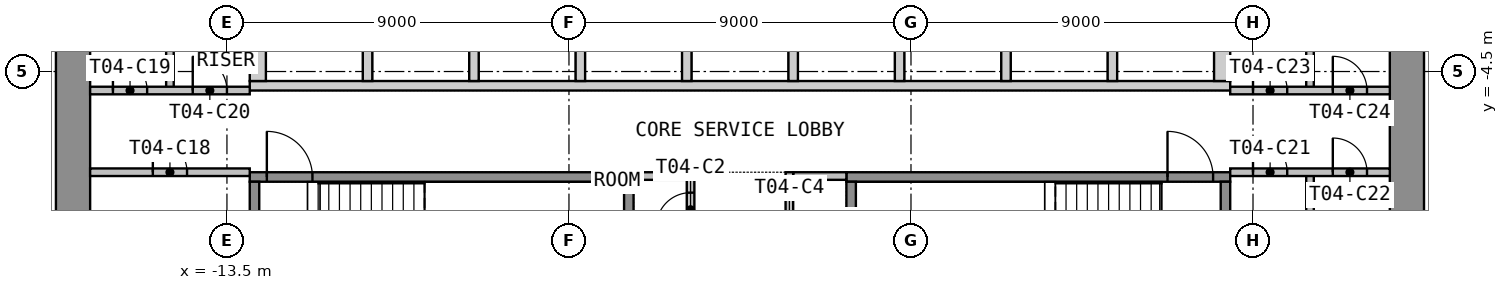
"""IFC4 building model, lengths in metres.
Left out: names, types, materials, properties, quantities, classifications, styles, units other than length and angle.
Written with IfcOpenShell. Run it as: python <this file> out.ifc"""

import sys

from ifc_helpers import new_model, si_unit, direction, frame, frame_2d, origin, place, context, subcontext, project, spatial, polyline, rectangle, outline, extrude, element, fill, save


model = new_model("IFC4")
c1 = context("Model", 3, precision=1e-05, world=origin(), true_north=direction((0.0, 1.0)))
c2 = subcontext(c1, "Body", "Model", "MODEL_VIEW")
j1 = project(units=[si_unit("LENGTHUNIT", "METRE"), si_unit("PLANEANGLEUNIT", "RADIAN")], contexts=[c1])
p1 = place(None, origin())
s1 = spatial("IfcSite", under=j1, at=p1, CompositionType="ELEMENT")
p2 = place(p1, origin())
s2 = spatial("IfcBuilding", under=s1, at=p2, CompositionType="ELEMENT")
p3 = place(p2, frame((0.0, 0.0, 65.1)))
s3 = spatial("IfcBuildingStorey", under=s2, at=p3, CompositionType="ELEMENT", Elevation=65.1)
p4 = place(p3, frame((-17.55, -12.6, 0.0), z_axis=(0.0, 0.0, 1.0), x_axis=(0.0, 1.0, 0.0)))
e1 = element("IfcWall", 1, at=p4, inside=s3, PredefinedType="SHEAR", context=c2, shape_type="SweptSolid", body=[
    extrude(rectangle(XDim=25.2, YDim=0.9, at=frame_2d((12.6, 0.0))), origin(), (0.0, 0.0, 1.0), 3.525),
])
p5 = place(p4, frame((11.4, 0.0, 0.0)))
e2 = element("IfcOpeningElement", 2, at=p5, cuts=e1, PredefinedType="OPENING", context=c2, shape_type="SweptSolid", body=[
    extrude(rectangle(XDim=2.4, YDim=2.1, at=frame_2d((1.2, 1.05))), frame((0.0, 0.46, 0.0), z_axis=(0.0, -1.0, 0.0), x_axis=(1.0, 0.0, 0.0)), (0.0, 0.0, 1.0), 0.92),
])
p6 = place(p3, frame((17.55, -12.6, 0.0), z_axis=(0.0, 0.0, 1.0), x_axis=(0.0, 1.0, 0.0)))
e3 = element("IfcWall", 3, at=p6, inside=s3, PredefinedType="SHEAR", context=c2, shape_type="SweptSolid", body=[
    extrude(rectangle(XDim=25.2, YDim=0.9, at=frame_2d((12.6, 0.0))), origin(), (0.0, 0.0, 1.0), 3.525),
])
p7 = place(p6, frame((11.4, 0.0, 0.0)))
e4 = element("IfcOpeningElement", 4, at=p7, cuts=e3, PredefinedType="OPENING", context=c2, shape_type="SweptSolid", body=[
    extrude(rectangle(XDim=2.4, YDim=2.1, at=frame_2d((1.2, 1.05))), frame((0.0, 0.46, 0.0), z_axis=(0.0, -1.0, 0.0), x_axis=(1.0, 0.0, 0.0)), (0.0, 0.0, 1.0), 0.92),
])
p8 = place(p3, origin())
e5 = element("IfcWall", 5, at=p8, inside=s3, PredefinedType="SHEAR", context=c2, shape_type="SweptSolid", body=[
    extrude(outline(polyline([(-12.9, -5.0), (12.9, -5.0), (12.9, -4.75), (-12.9, -4.75), (-12.9, -5.0)])), origin(), (0.0, 0.0, 1.0), 3.525),
])
p9 = place(p3, origin())
e6 = element("IfcWall", 6, at=p9, inside=s3, PredefinedType="SHEAR", context=c2, shape_type="SweptSolid", body=[
    extrude(outline(polyline([(-12.9, -4.75), (-12.475, -4.75), (-12.475, -2.05), (-12.9, -2.05), (-12.9, -4.75)])), origin(), (0.0, 0.0, 1.0), 3.525),
])
p10 = place(p3, origin())
e7 = element("IfcWall", 7, at=p10, inside=s3, PredefinedType="SHEAR", context=c2, shape_type="SweptSolid", body=[
    extrude(outline(polyline([(-9.925, -4.75), (-9.675, -4.75), (-9.675, -2.05), (-9.925, -2.05), (-9.925, -4.75)])), origin(), (0.0, 0.0, 1.0), 3.525),
])
p11 = place(p3, origin())
e8 = element("IfcWall", 8, at=p11, inside=s3, PredefinedType="SHEAR", context=c2, shape_type="SweptSolid", body=[
    extrude(outline(polyline([(-7.125, -4.75), (-6.875, -4.75), (-6.875, -2.05), (-7.125, -2.05), (-7.125, -4.75)])), origin(), (0.0, 0.0, 1.0), 3.525),
])
p12 = place(p3, origin())
e9 = element("IfcWall", 9, at=p12, inside=s3, PredefinedType="SHEAR", context=c2, shape_type="SweptSolid", body=[
    extrude(outline(polyline([(-4.325, -4.75), (-4.075, -4.75), (-4.075, -2.05), (-4.325, -2.05), (-4.325, -4.75)])), origin(), (0.0, 0.0, 1.0), 3.525),
])
p13 = place(p3, origin())
e10 = element("IfcWall", 10, at=p13, inside=s3, PredefinedType="SHEAR", context=c2, shape_type="SweptSolid", body=[
    extrude(outline(polyline([(-1.525, -4.75), (-1.275, -4.75), (-1.275, -2.05), (-1.525, -2.05), (-1.525, -4.75)])), origin(), (0.0, 0.0, 1.0), 3.525),
])
p14 = place(p3, origin())
e11 = element("IfcWall", 11, at=p14, inside=s3, PredefinedType="SHEAR", context=c2, shape_type="SweptSolid", body=[
    extrude(outline(polyline([(1.275, -4.75), (1.525, -4.75), (1.525, -2.05), (1.275, -2.05), (1.275, -4.75)])), origin(), (0.0, 0.0, 1.0), 3.525),
])
p15 = place(p3, origin())
e12 = element("IfcWall", 12, at=p15, inside=s3, PredefinedType="SHEAR", context=c2, shape_type="SweptSolid", body=[
    extrude(outline(polyline([(4.075, -4.75), (4.325, -4.75), (4.325, -2.05), (4.075, -2.05), (4.075, -4.75)])), origin(), (0.0, 0.0, 1.0), 3.525),
])
p16 = place(p3, origin())
e13 = element("IfcWall", 13, at=p16, inside=s3, PredefinedType="SHEAR", context=c2, shape_type="SweptSolid", body=[
    extrude(outline(polyline([(6.875, -4.75), (7.125, -4.75), (7.125, -2.05), (6.875, -2.05), (6.875, -4.75)])), origin(), (0.0, 0.0, 1.0), 3.525),
])
p17 = place(p3, origin())
e14 = element("IfcWall", 14, at=p17, inside=s3, PredefinedType="SHEAR", context=c2, shape_type="SweptSolid", body=[
    extrude(outline(polyline([(9.675, -4.75), (9.925, -4.75), (9.925, -2.05), (9.675, -2.05), (9.675, -4.75)])), origin(), (0.0, 0.0, 1.0), 3.525),
])
p18 = place(p3, origin())
e15 = element("IfcWall", 15, at=p18, inside=s3, PredefinedType="SHEAR", context=c2, shape_type="SweptSolid", body=[
    extrude(outline(polyline([(12.475, -4.75), (12.9, -4.75), (12.9, -2.05), (12.475, -2.05), (12.475, -4.75)])), origin(), (0.0, 0.0, 1.0), 3.525),
])
p19 = place(p3, frame((-12.9, -7.275, 0.0), z_axis=(0.0, 0.0, 1.0), x_axis=(1.0, 0.0, 0.0)))
e16 = element("IfcWall", 16, at=p19, inside=s3, PredefinedType="SHEAR", context=c2, shape_type="SweptSolid", body=[
    extrude(rectangle(XDim=10.1, YDim=0.25, at=frame_2d((5.05, 0.0))), origin(), (0.0, 0.0, 1.0), 3.525),
])
p20 = place(p19, frame((0.45, 0.0, 0.0)))
e17 = element("IfcOpeningElement", 17, at=p20, cuts=e16, PredefinedType="OPENING", context=c2, shape_type="SweptSolid", body=[
    extrude(rectangle(XDim=1.2, YDim=2.1, at=frame_2d((0.6, 1.05))), frame((0.0, 0.135, 0.0), z_axis=(0.0, -1.0, 0.0), x_axis=(1.0, 0.0, 0.0)), (0.0, 0.0, 1.0), 0.27),
])
for number, where, z_axis, x_axis in (
    (18, (-12.775, -10.65, 0.0), (0.0, 0.0, 1.0), (0.0, 1.0, 0.0)),
    (19, (-2.925, -10.65, 0.0), (0.0, 0.0, 1.0), (0.0, 1.0, 0.0)),
):
    element("IfcWall", number, at=place(p3, frame(where, z_axis=z_axis, x_axis=x_axis)), inside=s3, PredefinedType="SHEAR", context=c2, shape_type="SweptSolid", body=[
        extrude(rectangle(XDim=3.25, YDim=0.25, at=frame_2d((1.625, 0.0))), origin(), (0.0, 0.0, 1.0), 3.525),
    ])
p21 = place(p3, frame((2.8, -7.275, 0.0), z_axis=(0.0, 0.0, 1.0), x_axis=(1.0, 0.0, 0.0)))
e20 = element("IfcWall", 20, at=p21, inside=s3, PredefinedType="SHEAR", context=c2, shape_type="SweptSolid", body=[
    extrude(rectangle(XDim=10.1, YDim=0.25, at=frame_2d((5.05, 0.0))), origin(), (0.0, 0.0, 1.0), 3.525),
])
p22 = place(p21, frame((8.45, 0.0, 0.0)))
e21 = element("IfcOpeningElement", 21, at=p22, cuts=e20, PredefinedType="OPENING", context=c2, shape_type="SweptSolid", body=[
    extrude(rectangle(XDim=1.2, YDim=2.1, at=frame_2d((0.6, 1.05))), frame((0.0, 0.135, 0.0), z_axis=(0.0, -1.0, 0.0), x_axis=(1.0, 0.0, 0.0)), (0.0, 0.0, 1.0), 0.27),
])
for number, where, z_axis, x_axis in (
    (22, (2.925, -10.65, 0.0), (0.0, 0.0, 1.0), (0.0, 1.0, 0.0)),
    (23, (12.775, -10.65, 0.0), (0.0, 0.0, 1.0), (0.0, 1.0, 0.0)),
):
    element("IfcWall", number, at=place(p3, frame(where, z_axis=z_axis, x_axis=x_axis)), inside=s3, PredefinedType="SHEAR", context=c2, shape_type="SweptSolid", body=[
        extrude(rectangle(XDim=3.25, YDim=0.25, at=frame_2d((1.625, 0.0))), origin(), (0.0, 0.0, 1.0), 3.525),
    ])
for number, where, z_axis, x_axis in (
    (24, (-2.8, -7.25, 0.0), (0.0, 0.0, 1.0), (1.0, 0.0, 0.0)),
    (25, (1.4, -7.25, 0.0), (0.0, 0.0, 1.0), (1.0, 0.0, 0.0)),
):
    element("IfcWall", number, at=place(p3, frame(where, z_axis=z_axis, x_axis=x_axis)), inside=s3, PredefinedType="PARTITIONING", context=c2, shape_type="SweptSolid", body=[
        extrude(rectangle(XDim=1.4, YDim=0.2, at=frame_2d((0.7, 0.0))), origin(), (0.0, 0.0, 1.0), 3.525),
    ])
p23 = place(p3, frame((-1.3, -12.6, 0.0), z_axis=(0.0, 0.0, 1.0), x_axis=(0.0, 1.0, 0.0)))
e26 = element("IfcWall", 26, at=p23, inside=s3, PredefinedType="PARTITIONING", context=c2, shape_type="SweptSolid", body=[
    extrude(rectangle(XDim=5.45, YDim=0.2, at=frame_2d((2.725, 0.0))), origin(), (0.0, 0.0, 1.0), 3.525),
])
p24 = place(p23, frame((1.387, 0.0, 0.0)))
e27 = element("IfcOpeningElement", 27, at=p24, cuts=e26, PredefinedType="OPENING", context=c2, shape_type="SweptSolid", body=[
    extrude(rectangle(XDim=0.9, YDim=2.1, at=frame_2d((0.45, 1.05))), frame((0.0, 0.11, 0.0), z_axis=(0.0, -1.0, 0.0), x_axis=(1.0, 0.0, 0.0)), (0.0, 0.0, 1.0), 0.22),
])
p25 = place(p23, frame((4.012, 0.0, 0.0)))
e28 = element("IfcOpeningElement", 28, at=p25, cuts=e26, PredefinedType="OPENING", context=c2, shape_type="SweptSolid", body=[
    extrude(rectangle(XDim=0.9, YDim=2.1, at=frame_2d((0.45, 1.05))), frame((0.0, 0.11, 0.0), z_axis=(0.0, -1.0, 0.0), x_axis=(1.0, 0.0, 0.0)), (0.0, 0.0, 1.0), 0.22),
])
p26 = place(p3, frame((1.3, -12.6, 0.0), z_axis=(0.0, 0.0, 1.0), x_axis=(0.0, 1.0, 0.0)))
e29 = element("IfcWall", 29, at=p26, inside=s3, PredefinedType="PARTITIONING", context=c2, shape_type="SweptSolid", body=[
    extrude(rectangle(XDim=5.45, YDim=0.2, at=frame_2d((2.725, 0.0))), origin(), (0.0, 0.0, 1.0), 3.525),
])
p27 = place(p26, frame((0.863, 0.0, 0.0)))
e30 = element("IfcOpeningElement", 30, at=p27, cuts=e29, PredefinedType="OPENING", context=c2, shape_type="SweptSolid", body=[
    extrude(rectangle(XDim=0.9, YDim=2.1, at=frame_2d((0.45, 1.05))), frame((0.0, 0.11, 0.0), z_axis=(0.0, -1.0, 0.0), x_axis=(1.0, 0.0, 0.0)), (0.0, 0.0, 1.0), 0.22),
])
p28 = place(p26, frame((3.488, 0.0, 0.0)))
e31 = element("IfcOpeningElement", 31, at=p28, cuts=e29, PredefinedType="OPENING", context=c2, shape_type="SweptSolid", body=[
    extrude(rectangle(XDim=0.9, YDim=2.1, at=frame_2d((0.45, 1.05))), frame((0.0, 0.11, 0.0), z_axis=(0.0, -1.0, 0.0), x_axis=(1.0, 0.0, 0.0)), (0.0, 0.0, 1.0), 0.22),
])
p29 = place(p3, frame((-17.1, -7.15, 0.0), z_axis=(0.0, 0.0, 1.0), x_axis=(1.0, 0.0, 0.0)))
e32 = element("IfcWall", 32, at=p29, inside=s3, PredefinedType="PARTITIONING", context=c2, shape_type="SweptSolid", body=[
    extrude(rectangle(XDim=4.2, YDim=0.2, at=frame_2d((2.1, 0.0))), origin(), (0.0, 0.0, 1.0), 3.525),
])
p30 = place(p29, frame((1.65, 0.0, 0.0)))
e33 = element("IfcOpeningElement", 33, at=p30, cuts=e32, PredefinedType="OPENING", context=c2, shape_type="SweptSolid", body=[
    extrude(rectangle(XDim=0.9, YDim=2.1, at=frame_2d((0.45, 1.05))), frame((0.0, 0.11, 0.0), z_axis=(0.0, -1.0, 0.0), x_axis=(1.0, 0.0, 0.0)), (0.0, 0.0, 1.0), 0.22),
])
p31 = place(p3, frame((-15.0, -5.0, 0.0), z_axis=(0.0, 0.0, 1.0), x_axis=(0.0, 1.0, 0.0)))
e34 = element("IfcWall", 34, at=p31, inside=s3, PredefinedType="PARTITIONING", context=c2, shape_type="SweptSolid", body=[
    extrude(rectangle(XDim=3.2, YDim=0.2, at=frame_2d((1.6, 0.0))), origin(), (0.0, 0.0, 1.0), 3.525),
])
p32 = place(p3, frame((-17.1, -5.0, 0.0), z_axis=(0.0, 0.0, 1.0), x_axis=(1.0, 0.0, 0.0)))
e35 = element("IfcWall", 35, at=p32, inside=s3, PredefinedType="PARTITIONING", context=c2, shape_type="SweptSolid", body=[
    extrude(rectangle(XDim=4.2, YDim=0.2, at=frame_2d((2.1, 0.0))), origin(), (0.0, 0.0, 1.0), 3.525),
])
p33 = place(p32, frame((0.6, 0.0, 0.0)))
e36 = element("IfcOpeningElement", 36, at=p33, cuts=e35, PredefinedType="OPENING", context=c2, shape_type="SweptSolid", body=[
    extrude(rectangle(XDim=0.9, YDim=2.1, at=frame_2d((0.45, 1.05))), frame((0.0, 0.11, 0.0), z_axis=(0.0, -1.0, 0.0), x_axis=(1.0, 0.0, 0.0)), (0.0, 0.0, 1.0), 0.22),
])
p34 = place(p32, frame((2.7, 0.0, 0.0)))
e37 = element("IfcOpeningElement", 37, at=p34, cuts=e35, PredefinedType="OPENING", context=c2, shape_type="SweptSolid", body=[
    extrude(rectangle(XDim=0.9, YDim=2.1, at=frame_2d((0.45, 1.05))), frame((0.0, 0.11, 0.0), z_axis=(0.0, -1.0, 0.0), x_axis=(1.0, 0.0, 0.0)), (0.0, 0.0, 1.0), 0.22),
])
p35 = place(p3, frame((15.0, -12.6, 0.0), z_axis=(0.0, 0.0, 1.0), x_axis=(0.0, 1.0, 0.0)))
e38 = element("IfcWall", 38, at=p35, inside=s3, PredefinedType="PARTITIONING", context=c2, shape_type="SweptSolid", body=[
    extrude(rectangle(XDim=5.45, YDim=0.2, at=frame_2d((2.725, 0.0))), origin(), (0.0, 0.0, 1.0), 3.525),
])
p36 = place(p3, frame((12.9, -7.15, 0.0), z_axis=(0.0, 0.0, 1.0), x_axis=(1.0, 0.0, 0.0)))
e39 = element("IfcWall", 39, at=p36, inside=s3, PredefinedType="PARTITIONING", context=c2, shape_type="SweptSolid", body=[
    extrude(rectangle(XDim=4.2, YDim=0.2, at=frame_2d((2.1, 0.0))), origin(), (0.0, 0.0, 1.0), 3.525),
])
p37 = place(p36, frame((0.6, 0.0, 0.0)))
e40 = element("IfcOpeningElement", 40, at=p37, cuts=e39, PredefinedType="OPENING", context=c2, shape_type="SweptSolid", body=[
    extrude(rectangle(XDim=0.9, YDim=2.1, at=frame_2d((0.45, 1.05))), frame((0.0, 0.11, 0.0), z_axis=(0.0, -1.0, 0.0), x_axis=(1.0, 0.0, 0.0)), (0.0, 0.0, 1.0), 0.22),
])
p38 = place(p36, frame((2.7, 0.0, 0.0)))
e41 = element("IfcOpeningElement", 41, at=p38, cuts=e39, PredefinedType="OPENING", context=c2, shape_type="SweptSolid", body=[
    extrude(rectangle(XDim=0.9, YDim=2.1, at=frame_2d((0.45, 1.05))), frame((0.0, 0.11, 0.0), z_axis=(0.0, -1.0, 0.0), x_axis=(1.0, 0.0, 0.0)), (0.0, 0.0, 1.0), 0.22),
])
p39 = place(p3, frame((15.0, -5.0, 0.0), z_axis=(0.0, 0.0, 1.0), x_axis=(0.0, 1.0, 0.0)))
e42 = element("IfcWall", 42, at=p39, inside=s3, PredefinedType="PARTITIONING", context=c2, shape_type="SweptSolid", body=[
    extrude(rectangle(XDim=3.2, YDim=0.2, at=frame_2d((1.6, 0.0))), origin(), (0.0, 0.0, 1.0), 3.525),
])
p40 = place(p3, frame((12.9, -5.0, 0.0), z_axis=(0.0, 0.0, 1.0), x_axis=(1.0, 0.0, 0.0)))
e43 = element("IfcWall", 43, at=p40, inside=s3, PredefinedType="PARTITIONING", context=c2, shape_type="SweptSolid", body=[
    extrude(rectangle(XDim=4.2, YDim=0.2, at=frame_2d((2.1, 0.0))), origin(), (0.0, 0.0, 1.0), 3.525),
])
p41 = place(p40, frame((0.6, 0.0, 0.0)))
e44 = element("IfcOpeningElement", 44, at=p41, cuts=e43, PredefinedType="OPENING", context=c2, shape_type="SweptSolid", body=[
    extrude(rectangle(XDim=0.9, YDim=2.1, at=frame_2d((0.45, 1.05))), frame((0.0, 0.11, 0.0), z_axis=(0.0, -1.0, 0.0), x_axis=(1.0, 0.0, 0.0)), (0.0, 0.0, 1.0), 0.22),
])
p42 = place(p40, frame((2.7, 0.0, 0.0)))
e45 = element("IfcOpeningElement", 45, at=p42, cuts=e43, PredefinedType="OPENING", context=c2, shape_type="SweptSolid", body=[
    extrude(rectangle(XDim=0.9, YDim=2.1, at=frame_2d((0.45, 1.05))), frame((0.0, 0.11, 0.0), z_axis=(0.0, -1.0, 0.0), x_axis=(1.0, 0.0, 0.0)), (0.0, 0.0, 1.0), 0.22),
])
p43 = place(p20, origin())
e46 = element("IfcDoor", 46, at=p43, inside=s3, OperationType="SINGLE_SWING_LEFT", PredefinedType="DOOR", context=c2, shape_type="SweptSolid", body=[
    extrude(rectangle(XDim=1.2, YDim=2.1, at=frame_2d((0.6, 1.05))), frame((0.0, 0.025, 0.0), z_axis=(0.0, -1.0, 0.0), x_axis=(1.0, 0.0, 0.0)), (0.0, 0.0, 1.0), 0.05),
])
fill(e17, e46)
p44 = place(p22, origin())
e47 = element("IfcDoor", 47, at=p44, inside=s3, OperationType="SINGLE_SWING_LEFT", PredefinedType="DOOR", context=c2, shape_type="SweptSolid", body=[
    extrude(rectangle(XDim=1.2, YDim=2.1, at=frame_2d((0.6, 1.05))), frame((0.0, 0.025, 0.0), z_axis=(0.0, -1.0, 0.0), x_axis=(1.0, 0.0, 0.0)), (0.0, 0.0, 1.0), 0.05),
])
fill(e21, e47)
p45 = place(p25, origin())
e48 = element("IfcDoor", 48, at=p45, inside=s3, OperationType="SINGLE_SWING_LEFT", PredefinedType="DOOR", context=c2, shape_type="SweptSolid", body=[
    extrude(rectangle(XDim=0.9, YDim=2.1, at=frame_2d((0.45, 1.05))), frame((0.0, 0.025, 0.0), z_axis=(0.0, -1.0, 0.0), x_axis=(1.0, 0.0, 0.0)), (0.0, 0.0, 1.0), 0.05),
])
fill(e28, e48)
p46 = place(p30, origin())
e49 = element("IfcDoor", 49, at=p46, inside=s3, OperationType="SINGLE_SWING_LEFT", PredefinedType="DOOR", context=c2, shape_type="SweptSolid", body=[
    extrude(rectangle(XDim=0.9, YDim=2.1, at=frame_2d((0.45, 1.05))), frame((0.0, 0.025, 0.0), z_axis=(0.0, -1.0, 0.0), x_axis=(1.0, 0.0, 0.0)), (0.0, 0.0, 1.0), 0.05),
])
fill(e33, e49)
p47 = place(p33, origin())
e50 = element("IfcDoor", 50, at=p47, inside=s3, OperationType="SINGLE_SWING_LEFT", PredefinedType="DOOR", context=c2, shape_type="SweptSolid", body=[
    extrude(rectangle(XDim=0.9, YDim=2.1, at=frame_2d((0.45, 1.05))), frame((0.0, 0.025, 0.0), z_axis=(0.0, -1.0, 0.0), x_axis=(1.0, 0.0, 0.0)), (0.0, 0.0, 1.0), 0.05),
])
fill(e36, e50)
p48 = place(p34, origin())
e51 = element("IfcDoor", 51, at=p48, inside=s3, OperationType="SINGLE_SWING_LEFT", PredefinedType="DOOR", context=c2, shape_type="SweptSolid", body=[
    extrude(rectangle(XDim=0.9, YDim=2.1, at=frame_2d((0.45, 1.05))), frame((0.0, 0.025, 0.0), z_axis=(0.0, -1.0, 0.0), x_axis=(1.0, 0.0, 0.0)), (0.0, 0.0, 1.0), 0.05),
])
fill(e37, e51)
p49 = place(p37, origin())
e52 = element("IfcDoor", 52, at=p49, inside=s3, OperationType="SINGLE_SWING_LEFT", PredefinedType="DOOR", context=c2, shape_type="SweptSolid", body=[
    extrude(rectangle(XDim=0.9, YDim=2.1, at=frame_2d((0.45, 1.05))), frame((0.0, 0.025, 0.0), z_axis=(0.0, -1.0, 0.0), x_axis=(1.0, 0.0, 0.0)), (0.0, 0.0, 1.0), 0.05),
])
fill(e40, e52)
p50 = place(p38, origin())
e53 = element("IfcDoor", 53, at=p50, inside=s3, OperationType="SINGLE_SWING_LEFT", PredefinedType="DOOR", context=c2, shape_type="SweptSolid", body=[
    extrude(rectangle(XDim=0.9, YDim=2.1, at=frame_2d((0.45, 1.05))), frame((0.0, 0.025, 0.0), z_axis=(0.0, -1.0, 0.0), x_axis=(1.0, 0.0, 0.0)), (0.0, 0.0, 1.0), 0.05),
])
fill(e41, e53)
p51 = place(p41, origin())
e54 = element("IfcDoor", 54, at=p51, inside=s3, OperationType="SINGLE_SWING_LEFT", PredefinedType="DOOR", context=c2, shape_type="SweptSolid", body=[
    extrude(rectangle(XDim=0.9, YDim=2.1, at=frame_2d((0.45, 1.05))), frame((0.0, 0.025, 0.0), z_axis=(0.0, -1.0, 0.0), x_axis=(1.0, 0.0, 0.0)), (0.0, 0.0, 1.0), 0.05),
])
fill(e44, e54)
p52 = place(p42, origin())
e55 = element("IfcDoor", 55, at=p52, inside=s3, OperationType="SINGLE_SWING_LEFT", PredefinedType="DOOR", context=c2, shape_type="SweptSolid", body=[
    extrude(rectangle(XDim=0.9, YDim=2.1, at=frame_2d((0.45, 1.05))), frame((0.0, 0.025, 0.0), z_axis=(0.0, -1.0, 0.0), x_axis=(1.0, 0.0, 0.0)), (0.0, 0.0, 1.0), 0.05),
])
fill(e45, e55)
save(model, sys.argv[1])
